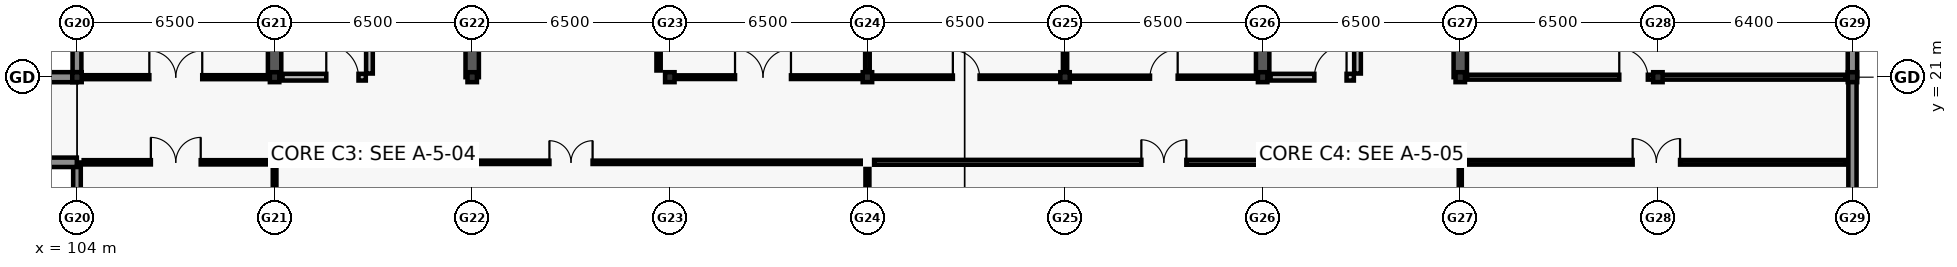
"""IFC4 building model, lengths in metres.
Left out: names, types, materials, properties, quantities, classifications, styles, units other than length and angle.
Written with IfcOpenShell. Run it as: python <this file> out.ifc"""

import sys

from ifc_helpers import new_model, si_unit, direction, frame, frame_2d, origin, origin_2d, place, context, subcontext, project, spatial, rectangle, i_section, extrude, element, fill, save


model = new_model("IFC4")
c1 = context("Model", 3, precision=1e-05, world=origin(), true_north=direction((0.0, 1.0)))
c2 = subcontext(c1, "Body", "Model", "MODEL_VIEW")
j1 = project(units=[si_unit("LENGTHUNIT", "METRE"), si_unit("PLANEANGLEUNIT", "RADIAN")], contexts=[c1])
p1 = place(None, origin())
s1 = spatial("IfcSite", under=j1, at=p1, CompositionType="ELEMENT")
p2 = place(p1, origin())
s2 = spatial("IfcBuilding", under=s1, at=p2, CompositionType="ELEMENT")
p3 = place(p2, frame((0.0, 0.0, 5.4)))
s3 = spatial("IfcBuildingStorey", under=s2, at=p3, CompositionType="ELEMENT", Elevation=5.4)
for number, where, z_axis, x_axis in (
    (1, (104.0, 21.0, 0.0), (0.0, 0.0, 1.0), (1.0, 0.0, 0.0)),
    (2, (110.5, 21.0, 0.0), (0.0, 0.0, 1.0), (1.0, 0.0, 0.0)),
    (3, (117.0, 21.0, 0.0), (0.0, 0.0, 1.0), (1.0, 0.0, 0.0)),
    (4, (123.5, 21.0, 0.0), (0.0, 0.0, 1.0), (1.0, 0.0, 0.0)),
    (5, (130.0, 21.0, 0.0), (0.0, 0.0, 1.0), (1.0, 0.0, 0.0)),
    (6, (136.5, 21.0, 0.0), (0.0, 0.0, 1.0), (1.0, 0.0, 0.0)),
    (7, (143.0, 21.0, 0.0), (0.0, 0.0, 1.0), (1.0, 0.0, 0.0)),
    (8, (149.5, 21.0, 0.0), (0.0, 0.0, 1.0), (1.0, 0.0, 0.0)),
    (9, (156.0, 21.0, 0.0), (0.0, 0.0, 1.0), (1.0, 0.0, 0.0)),
    (10, (162.4, 21.0, 0.0), (0.0, 0.0, 1.0), (1.0, 0.0, 0.0)),
):
    element("IfcColumn", number, at=place(p3, frame(where, z_axis=z_axis, x_axis=x_axis)), inside=s3, PredefinedType="COLUMN", context=c2, shape_type="SweptSolid", body=[
        extrude(i_section(OverallWidth=0.311, OverallDepth=0.327, WebThickness=0.016, FlangeThickness=0.025, FilletRadius=0.017, at=origin_2d()), origin(), (0.0, 0.0, 1.0), 4.2),
    ])
for number, where, z_axis, x_axis in (
    (11, (110.5, 21.0, 0.0), (0.0, 0.0, 1.0), (0.0, 1.0, 0.0)),
    (12, (117.0, 21.0, 0.0), (0.0, 0.0, 1.0), (0.0, 1.0, 0.0)),
    (13, (143.0, 21.0, 0.0), (0.0, 0.0, 1.0), (0.0, 1.0, 0.0)),
    (14, (149.5, 21.0, 0.0), (0.0, 0.0, 1.0), (0.0, 1.0, 0.0)),
):
    element("IfcWall", number, at=place(p3, frame(where, z_axis=z_axis, x_axis=x_axis)), inside=s3, PredefinedType="SHEAR", context=c2, shape_type="SweptSolid", body=[
        extrude(rectangle(XDim=6.38, YDim=0.44, at=frame_2d((3.19, 0.0))), origin(), (0.0, 0.0, 1.0), 3.96),
    ])
p4 = place(p3, frame((104.0, 14.405, 0.0), z_axis=(0.0, 0.0, 1.0), x_axis=(0.0, 1.0, 0.0)))
e15 = element("IfcWall", 15, at=p4, inside=s3, PredefinedType="SOLIDWALL", context=c2, shape_type="SweptSolid", body=[
    extrude(rectangle(XDim=3.79, YDim=0.25, at=frame_2d((1.895, 0.0))), origin(), (0.0, 0.0, 1.0), 3.32),
])
p5 = place(p4, frame((1.295, 0.0, 0.8)))
e16 = element("IfcOpeningElement", 16, at=p5, cuts=e15, PredefinedType="OPENING", context=c2, shape_type="SweptSolid", body=[
    extrude(rectangle(XDim=1.2, YDim=2.05, at=frame_2d((0.6, 1.025))), frame((0.0, 0.135, 0.0), z_axis=(0.0, -1.0, 0.0), x_axis=(1.0, 0.0, 0.0)), (0.0, 0.0, 1.0), 0.27),
])
p6 = place(p3, frame((162.4, 20.995, 0.0), z_axis=(0.0, 0.0, 1.0), x_axis=(0.0, -1.0, 0.0)))
e17 = element("IfcWall", 17, at=p6, inside=s3, PredefinedType="SOLIDWALL", context=c2, shape_type="SweptSolid", body=[
    extrude(rectangle(XDim=6.59, YDim=0.27, at=frame_2d((3.295, 0.0))), origin(), (0.0, 0.0, 1.0), 3.32),
])
p7 = place(p6, frame((4.002, 0.0, 0.8)))
e18 = element("IfcOpeningElement", 18, at=p7, cuts=e17, PredefinedType="OPENING", context=c2, shape_type="SweptSolid", body=[
    extrude(rectangle(XDim=1.35, YDim=2.05, at=frame_2d((0.675, 1.025))), frame((0.0, 0.145, 0.0), z_axis=(0.0, -1.0, 0.0), x_axis=(1.0, 0.0, 0.0)), (0.0, 0.0, 1.0), 0.29),
])
p8 = place(p3, frame((104.0, 21.005, 0.0), z_axis=(0.0, 0.0, 1.0), x_axis=(0.0, 1.0, 0.0)))
e19 = element("IfcWall", 19, at=p8, inside=s3, PredefinedType="SOLIDWALL", context=c2, shape_type="SweptSolid", body=[
    extrude(rectangle(XDim=6.59, YDim=0.29, at=frame_2d((3.295, 0.0))), origin(), (0.0, 0.0, 1.0), 3.32),
])
p9 = place(p8, frame((2.545, 0.0, 0.8)))
e20 = element("IfcOpeningElement", 20, at=p9, cuts=e19, PredefinedType="OPENING", context=c2, shape_type="SweptSolid", body=[
    extrude(rectangle(XDim=1.5, YDim=2.05, at=frame_2d((0.75, 1.025))), frame((0.0, 0.155, 0.0), z_axis=(0.0, -1.0, 0.0), x_axis=(1.0, 0.0, 0.0)), (0.0, 0.0, 1.0), 0.31),
])
p10 = place(p3, frame((162.4, 27.595, 0.0), z_axis=(0.0, 0.0, 1.0), x_axis=(0.0, -1.0, 0.0)))
e21 = element("IfcWall", 21, at=p10, inside=s3, PredefinedType="SOLIDWALL", context=c2, shape_type="SweptSolid", body=[
    extrude(rectangle(XDim=6.59, YDim=0.31, at=frame_2d((3.295, 0.0))), origin(), (0.0, 0.0, 1.0), 3.32),
])
p11 = place(p10, frame((2.47, 0.0, 0.8)))
e22 = element("IfcOpeningElement", 22, at=p11, cuts=e21, PredefinedType="OPENING", context=c2, shape_type="SweptSolid", body=[
    extrude(rectangle(XDim=1.65, YDim=2.05, at=frame_2d((0.825, 1.025))), frame((0.0, 0.165, 0.0), z_axis=(0.0, -1.0, 0.0), x_axis=(1.0, 0.0, 0.0)), (0.0, 0.0, 1.0), 0.33),
])
p12 = place(p3, frame((103.995, 18.2, 0.0), z_axis=(0.0, 0.0, 1.0), x_axis=(-1.0, 0.0, 0.0)))
e23 = element("IfcWall", 23, at=p12, inside=s3, PredefinedType="SOLIDWALL", context=c2, shape_type="SweptSolid", body=[
    extrude(rectangle(XDim=1.19, YDim=0.31, at=frame_2d((0.595, 0.0))), origin(), (0.0, 0.0, 1.0), 3.32),
])
p13 = place(p3, frame((102.805, 21.0, 0.0), z_axis=(0.0, 0.0, 1.0), x_axis=(1.0, 0.0, 0.0)))
e24 = element("IfcWall", 24, at=p13, inside=s3, PredefinedType="SOLIDWALL", context=c2, shape_type="SweptSolid", body=[
    extrude(rectangle(XDim=1.19, YDim=0.33, at=frame_2d((0.595, 0.0))), origin(), (0.0, 0.0, 1.0), 3.32),
])
p14 = place(p3, frame((113.62, 21.12, 0.0), z_axis=(0.0, 0.0, 1.0), x_axis=(0.0, 1.0, 0.0)))
e25 = element("IfcWall", 25, at=p14, inside=s3, PredefinedType="SOLIDWALL", context=c2, shape_type="SweptSolid", body=[
    extrude(rectangle(XDim=6.255, YDim=0.22, at=frame_2d((3.127, 0.0))), origin(), (0.0, 0.0, 1.0), 3.96),
])
p15 = place(p3, frame((110.76, 21.0, 0.0), z_axis=(0.0, 0.0, 1.0), x_axis=(1.0, 0.0, 0.0)))
e26 = element("IfcWall", 26, at=p15, inside=s3, PredefinedType="SOLIDWALL", context=c2, shape_type="SweptSolid", body=[
    extrude(rectangle(XDim=2.74, YDim=0.22, at=frame_2d((1.37, 0.0))), origin(), (0.0, 0.0, 1.0), 3.32),
])
p16 = place(p15, frame((1.44, 0.0, 0.0)))
e27 = element("IfcOpeningElement", 27, at=p16, cuts=e26, PredefinedType="OPENING", context=c2, shape_type="SweptSolid", body=[
    extrude(rectangle(XDim=1.06, YDim=2.1, at=frame_2d((0.53, 1.05))), frame((0.0, 0.12, 0.0), z_axis=(0.0, -1.0, 0.0), x_axis=(1.0, 0.0, 0.0)), (0.0, 0.0, 1.0), 0.24),
])
p17 = place(p3, frame((146.12, 21.12, 0.0), z_axis=(0.0, 0.0, 1.0), x_axis=(0.0, 1.0, 0.0)))
e28 = element("IfcWall", 28, at=p17, inside=s3, PredefinedType="SOLIDWALL", context=c2, shape_type="SweptSolid", body=[
    extrude(rectangle(XDim=6.255, YDim=0.22, at=frame_2d((3.127, 0.0))), origin(), (0.0, 0.0, 1.0), 3.96),
])
p18 = place(p3, frame((143.26, 21.0, 0.0), z_axis=(0.0, 0.0, 1.0), x_axis=(1.0, 0.0, 0.0)))
e29 = element("IfcWall", 29, at=p18, inside=s3, PredefinedType="SOLIDWALL", context=c2, shape_type="SweptSolid", body=[
    extrude(rectangle(XDim=2.74, YDim=0.22, at=frame_2d((1.37, 0.0))), origin(), (0.0, 0.0, 1.0), 3.32),
])
p19 = place(p18, frame((1.44, 0.0, 0.0)))
e30 = element("IfcOpeningElement", 30, at=p19, cuts=e29, PredefinedType="OPENING", context=c2, shape_type="SweptSolid", body=[
    extrude(rectangle(XDim=1.06, YDim=2.1, at=frame_2d((0.53, 1.05))), frame((0.0, 0.12, 0.0), z_axis=(0.0, -1.0, 0.0), x_axis=(1.0, 0.0, 0.0)), (0.0, 0.0, 1.0), 0.24),
])
p20 = place(p3, frame((123.13, 21.22, 0.0), z_axis=(0.0, 0.0, 1.0), x_axis=(0.0, 1.0, 0.0)))
e31 = element("IfcWall", 31, at=p20, inside=s3, PredefinedType="PARTITIONING", context=c2, shape_type="SweptSolid", body=[
    extrude(rectangle(XDim=2.76, YDim=0.14, at=frame_2d((1.38, 0.0))), origin(), (0.0, 0.0, 1.0), 3.3),
])
p21 = place(p20, frame((0.88, 0.0, 0.0)))
e32 = element("IfcOpeningElement", 32, at=p21, cuts=e31, PredefinedType="OPENING", context=c2, shape_type="SweptSolid", body=[
    extrude(rectangle(XDim=1.0, YDim=2.12, at=frame_2d((0.5, 1.06))), frame((0.0, 0.08, 0.0), z_axis=(0.0, -1.0, 0.0), x_axis=(1.0, 0.0, 0.0)), (0.0, 0.0, 1.0), 0.16),
])
p22 = place(p3, frame((130.0, 8.02, 0.0), z_axis=(0.0, 0.0, 1.0), x_axis=(0.0, 1.0, 0.0)))
e33 = element("IfcWall", 33, at=p22, inside=s3, PredefinedType="PARTITIONING", context=c2, shape_type="SweptSolid", body=[
    extrude(rectangle(XDim=9.96, YDim=0.13, at=frame_2d((4.98, 0.0))), origin(), (0.0, 0.0, 1.0), 3.3),
])
p23 = place(p3, frame((110.5, 14.62, 0.0), z_axis=(0.0, 0.0, 1.0), x_axis=(0.0, 1.0, 0.0)))
e34 = element("IfcWall", 34, at=p23, inside=s3, PredefinedType="PARTITIONING", context=c2, shape_type="SweptSolid", body=[
    extrude(rectangle(XDim=3.36, YDim=0.12, at=frame_2d((1.68, 0.0))), origin(), (0.0, 0.0, 1.0), 3.3),
])
p24 = place(p3, frame((110.72, 18.2, 0.0), z_axis=(0.0, 0.0, 1.0), x_axis=(1.0, 0.0, 0.0)))
e35 = element("IfcWall", 35, at=p24, inside=s3, PredefinedType="PARTITIONING", context=c2, shape_type="SweptSolid", body=[
    extrude(rectangle(XDim=19.06, YDim=0.11, at=frame_2d((9.53, 0.0))), origin(), (0.0, 0.0, 1.0), 3.3),
])
p25 = place(p24, frame((8.82, 0.0, 0.0)))
e36 = element("IfcOpeningElement", 36, at=p25, cuts=e35, PredefinedType="OPENING", context=c2, shape_type="SweptSolid", body=[
    extrude(rectangle(XDim=1.42, YDim=2.15, at=frame_2d((0.71, 1.075))), frame((0.0, 0.065, 0.0), z_axis=(0.0, -1.0, 0.0), x_axis=(1.0, 0.0, 0.0)), (0.0, 0.0, 1.0), 0.13),
])
p26 = place(p3, frame((149.5, 8.02, 0.0), z_axis=(0.0, 0.0, 1.0), x_axis=(0.0, 1.0, 0.0)))
e37 = element("IfcWall", 37, at=p26, inside=s3, PredefinedType="PARTITIONING", context=c2, shape_type="SweptSolid", body=[
    extrude(rectangle(XDim=9.96, YDim=0.1, at=frame_2d((4.98, 0.0))), origin(), (0.0, 0.0, 1.0), 3.3),
])
p27 = place(p3, frame((130.22, 18.2, 0.0), z_axis=(0.0, 0.0, 1.0), x_axis=(1.0, 0.0, 0.0)))
e38 = element("IfcWall", 38, at=p27, inside=s3, PredefinedType="PARTITIONING", context=c2, shape_type="SweptSolid", body=[
    extrude(rectangle(XDim=19.06, YDim=0.16, at=frame_2d((9.53, 0.0))), origin(), (0.0, 0.0, 1.0), 3.3),
])
p28 = place(p27, frame((8.79, 0.0, 0.0)))
e39 = element("IfcOpeningElement", 39, at=p28, cuts=e38, PredefinedType="OPENING", context=c2, shape_type="SweptSolid", body=[
    extrude(rectangle(XDim=1.48, YDim=2.18, at=frame_2d((0.74, 1.09))), frame((0.0, 0.09, 0.0), z_axis=(0.0, -1.0, 0.0), x_axis=(1.0, 0.0, 0.0)), (0.0, 0.0, 1.0), 0.18),
])
p29 = place(p3, frame((149.72, 18.2, 0.0), z_axis=(0.0, 0.0, 1.0), x_axis=(1.0, 0.0, 0.0)))
e40 = element("IfcWall", 40, at=p29, inside=s3, PredefinedType="PARTITIONING", context=c2, shape_type="SweptSolid", body=[
    extrude(rectangle(XDim=12.46, YDim=0.15, at=frame_2d((6.23, 0.0))), origin(), (0.0, 0.0, 1.0), 3.3),
])
p30 = place(p29, frame((5.45, 0.0, 0.0)))
e41 = element("IfcOpeningElement", 41, at=p30, cuts=e40, PredefinedType="OPENING", context=c2, shape_type="SweptSolid", body=[
    extrude(rectangle(XDim=1.56, YDim=2.18, at=frame_2d((0.78, 1.09))), frame((0.0, 0.085, 0.0), z_axis=(0.0, -1.0, 0.0), x_axis=(1.0, 0.0, 0.0)), (0.0, 0.0, 1.0), 0.17),
])
p31 = place(p3, frame((104.22, 18.2, 0.0), z_axis=(0.0, 0.0, 1.0), x_axis=(1.0, 0.0, 0.0)))
e42 = element("IfcWall", 42, at=p31, inside=s3, PredefinedType="PARTITIONING", context=c2, shape_type="SweptSolid", body=[
    extrude(rectangle(XDim=6.06, YDim=0.14, at=frame_2d((3.03, 0.0))), origin(), (0.0, 0.0, 1.0), 3.3),
])
p32 = place(p31, frame((2.21, 0.0, 0.0)))
e43 = element("IfcOpeningElement", 43, at=p32, cuts=e42, PredefinedType="OPENING", context=c2, shape_type="SweptSolid", body=[
    extrude(rectangle(XDim=1.64, YDim=2.2, at=frame_2d((0.82, 1.1))), frame((0.0, 0.08, 0.0), z_axis=(0.0, -1.0, 0.0), x_axis=(1.0, 0.0, 0.0)), (0.0, 0.0, 1.0), 0.16),
])
p33 = place(p3, frame((104.22, 21.0, 0.0), z_axis=(0.0, 0.0, 1.0), x_axis=(1.0, 0.0, 0.0)))
e44 = element("IfcWall", 44, at=p33, inside=s3, PredefinedType="PARTITIONING", context=c2, shape_type="SweptSolid", body=[
    extrude(rectangle(XDim=6.06, YDim=0.13, at=frame_2d((3.03, 0.0))), origin(), (0.0, 0.0, 1.0), 3.3),
])
p34 = place(p33, frame((2.16, 0.0, 0.0)))
e45 = element("IfcOpeningElement", 45, at=p34, cuts=e44, PredefinedType="OPENING", context=c2, shape_type="SweptSolid", body=[
    extrude(rectangle(XDim=1.74, YDim=2.2, at=frame_2d((0.87, 1.1))), frame((0.0, 0.075, 0.0), z_axis=(0.0, -1.0, 0.0), x_axis=(1.0, 0.0, 0.0)), (0.0, 0.0, 1.0), 0.15),
])
p35 = place(p3, frame((123.35, 21.0, 0.0), z_axis=(0.0, 0.0, 1.0), x_axis=(1.0, 0.0, 0.0)))
e46 = element("IfcWall", 46, at=p35, inside=s3, PredefinedType="PARTITIONING", context=c2, shape_type="SweptSolid", body=[
    extrude(rectangle(XDim=6.43, YDim=0.12, at=frame_2d((3.215, 0.0))), origin(), (0.0, 0.0, 1.0), 3.3),
])
p36 = place(p35, frame((2.295, 0.0, 0.0)))
e47 = element("IfcOpeningElement", 47, at=p36, cuts=e46, PredefinedType="OPENING", context=c2, shape_type="SweptSolid", body=[
    extrude(rectangle(XDim=1.84, YDim=2.22, at=frame_2d((0.92, 1.11))), frame((0.0, 0.07, 0.0), z_axis=(0.0, -1.0, 0.0), x_axis=(1.0, 0.0, 0.0)), (0.0, 0.0, 1.0), 0.14),
])
p37 = place(p3, frame((130.22, 21.0, 0.0), z_axis=(0.0, 0.0, 1.0), x_axis=(1.0, 0.0, 0.0)))
e48 = element("IfcWall", 48, at=p37, inside=s3, PredefinedType="PARTITIONING", context=c2, shape_type="SweptSolid", body=[
    extrude(rectangle(XDim=6.06, YDim=0.11, at=frame_2d((3.03, 0.0))), origin(), (0.0, 0.0, 1.0), 3.3),
])
p38 = place(p37, frame((2.59, 0.0, 0.0)))
e49 = element("IfcOpeningElement", 49, at=p38, cuts=e48, PredefinedType="OPENING", context=c2, shape_type="SweptSolid", body=[
    extrude(rectangle(XDim=0.88, YDim=2.04, at=frame_2d((0.44, 1.02))), frame((0.0, 0.065, 0.0), z_axis=(0.0, -1.0, 0.0), x_axis=(1.0, 0.0, 0.0)), (0.0, 0.0, 1.0), 0.13),
])
p39 = place(p3, frame((136.72, 21.0, 0.0), z_axis=(0.0, 0.0, 1.0), x_axis=(1.0, 0.0, 0.0)))
e50 = element("IfcWall", 50, at=p39, inside=s3, PredefinedType="PARTITIONING", context=c2, shape_type="SweptSolid", body=[
    extrude(rectangle(XDim=6.06, YDim=0.1, at=frame_2d((3.03, 0.0))), origin(), (0.0, 0.0, 1.0), 3.3),
])
p40 = place(p39, frame((2.575, 0.0, 0.0)))
e51 = element("IfcOpeningElement", 51, at=p40, cuts=e50, PredefinedType="OPENING", context=c2, shape_type="SweptSolid", body=[
    extrude(rectangle(XDim=0.91, YDim=2.06, at=frame_2d((0.455, 1.03))), frame((0.0, 0.06, 0.0), z_axis=(0.0, -1.0, 0.0), x_axis=(1.0, 0.0, 0.0)), (0.0, 0.0, 1.0), 0.12),
])
p41 = place(p3, frame((149.72, 21.0, 0.0), z_axis=(0.0, 0.0, 1.0), x_axis=(1.0, 0.0, 0.0)))
e52 = element("IfcWall", 52, at=p41, inside=s3, PredefinedType="PARTITIONING", context=c2, shape_type="SweptSolid", body=[
    extrude(rectangle(XDim=12.46, YDim=0.16, at=frame_2d((6.23, 0.0))), origin(), (0.0, 0.0, 1.0), 3.3),
])
p42 = place(p41, frame((5.01, 0.0, 0.0)))
e53 = element("IfcOpeningElement", 53, at=p42, cuts=e52, PredefinedType="OPENING", context=c2, shape_type="SweptSolid", body=[
    extrude(rectangle(XDim=0.94, YDim=2.08, at=frame_2d((0.47, 1.04))), frame((0.0, 0.09, 0.0), z_axis=(0.0, -1.0, 0.0), x_axis=(1.0, 0.0, 0.0)), (0.0, 0.0, 1.0), 0.18),
])
p43 = place(p3, frame((130.0, 21.22, 0.0), z_axis=(0.0, 0.0, 1.0), x_axis=(0.0, 1.0, 0.0)))
e54 = element("IfcWall", 54, at=p43, inside=s3, PredefinedType="PARTITIONING", context=c2, shape_type="SweptSolid", body=[
    extrude(rectangle(XDim=6.16, YDim=0.15, at=frame_2d((3.08, 0.0))), origin(), (0.0, 0.0, 1.0), 3.3),
])
p44 = place(p3, frame((136.5, 21.22, 0.0), z_axis=(0.0, 0.0, 1.0), x_axis=(0.0, 1.0, 0.0)))
e55 = element("IfcWall", 55, at=p44, inside=s3, PredefinedType="PARTITIONING", context=c2, shape_type="SweptSolid", body=[
    extrude(rectangle(XDim=6.16, YDim=0.14, at=frame_2d((3.08, 0.0))), origin(), (0.0, 0.0, 1.0), 3.3),
])
p45 = place(p16, origin())
e56 = element("IfcDoor", 56, at=p45, inside=s3, OperationType="SINGLE_SWING_LEFT", PredefinedType="DOOR", context=c2, shape_type="SweptSolid", body=[
    extrude(rectangle(XDim=1.06, YDim=2.1, at=frame_2d((0.53, 1.05))), frame((0.0, 0.025, 0.0), z_axis=(0.0, -1.0, 0.0), x_axis=(1.0, 0.0, 0.0)), (0.0, 0.0, 1.0), 0.05),
])
fill(e27, e56)
p46 = place(p19, origin())
e57 = element("IfcDoor", 57, at=p46, inside=s3, OperationType="SINGLE_SWING_RIGHT", PredefinedType="DOOR", context=c2, shape_type="SweptSolid", body=[
    extrude(rectangle(XDim=1.06, YDim=2.1, at=frame_2d((0.53, 1.05))), frame((0.0, 0.025, 0.0), z_axis=(0.0, -1.0, 0.0), x_axis=(1.0, 0.0, 0.0)), (0.0, 0.0, 1.0), 0.05),
])
fill(e30, e57)
p47 = place(p25, origin())
e58 = element("IfcDoor", 58, at=p47, inside=s3, OperationType="DOUBLE_DOOR_SINGLE_SWING", PredefinedType="DOOR", context=c2, shape_type="SweptSolid", body=[
    extrude(rectangle(XDim=1.42, YDim=2.15, at=frame_2d((0.71, 1.075))), frame((0.0, 0.025, 0.0), z_axis=(0.0, -1.0, 0.0), x_axis=(1.0, 0.0, 0.0)), (0.0, 0.0, 1.0), 0.05),
])
fill(e36, e58)
p48 = place(p28, origin())
e59 = element("IfcDoor", 59, at=p48, inside=s3, OperationType="DOUBLE_DOOR_SINGLE_SWING", PredefinedType="DOOR", context=c2, shape_type="SweptSolid", body=[
    extrude(rectangle(XDim=1.48, YDim=2.18, at=frame_2d((0.74, 1.09))), frame((0.0, 0.025, 0.0), z_axis=(0.0, -1.0, 0.0), x_axis=(1.0, 0.0, 0.0)), (0.0, 0.0, 1.0), 0.05),
])
fill(e39, e59)
p49 = place(p30, origin())
e60 = element("IfcDoor", 60, at=p49, inside=s3, OperationType="DOUBLE_DOOR_SINGLE_SWING", PredefinedType="DOOR", context=c2, shape_type="SweptSolid", body=[
    extrude(rectangle(XDim=1.56, YDim=2.18, at=frame_2d((0.78, 1.09))), frame((0.0, 0.025, 0.0), z_axis=(0.0, -1.0, 0.0), x_axis=(1.0, 0.0, 0.0)), (0.0, 0.0, 1.0), 0.05),
])
fill(e41, e60)
p50 = place(p32, origin())
e61 = element("IfcDoor", 61, at=p50, inside=s3, OperationType="DOUBLE_DOOR_SINGLE_SWING", PredefinedType="DOOR", context=c2, shape_type="SweptSolid", body=[
    extrude(rectangle(XDim=1.64, YDim=2.2, at=frame_2d((0.82, 1.1))), frame((0.0, 0.025, 0.0), z_axis=(0.0, -1.0, 0.0), x_axis=(1.0, 0.0, 0.0)), (0.0, 0.0, 1.0), 0.05),
])
fill(e43, e61)
p51 = place(p34, origin())
e62 = element("IfcDoor", 62, at=p51, inside=s3, OperationType="DOUBLE_DOOR_SINGLE_SWING", PredefinedType="DOOR", context=c2, shape_type="SweptSolid", body=[
    extrude(rectangle(XDim=1.74, YDim=2.2, at=frame_2d((0.87, 1.1))), frame((0.0, 0.025, 0.0), z_axis=(0.0, -1.0, 0.0), x_axis=(1.0, 0.0, 0.0)), (0.0, 0.0, 1.0), 0.05),
])
fill(e45, e62)
p52 = place(p36, origin())
e63 = element("IfcDoor", 63, at=p52, inside=s3, OperationType="DOUBLE_DOOR_SINGLE_SWING", PredefinedType="DOOR", context=c2, shape_type="SweptSolid", body=[
    extrude(rectangle(XDim=1.84, YDim=2.22, at=frame_2d((0.92, 1.11))), frame((0.0, 0.025, 0.0), z_axis=(0.0, -1.0, 0.0), x_axis=(1.0, 0.0, 0.0)), (0.0, 0.0, 1.0), 0.05),
])
fill(e47, e63)
p53 = place(p38, origin())
e64 = element("IfcDoor", 64, at=p53, inside=s3, OperationType="SINGLE_SWING_LEFT", PredefinedType="DOOR", context=c2, shape_type="SweptSolid", body=[
    extrude(rectangle(XDim=0.88, YDim=2.04, at=frame_2d((0.44, 1.02))), frame((0.0, 0.025, 0.0), z_axis=(0.0, -1.0, 0.0), x_axis=(1.0, 0.0, 0.0)), (0.0, 0.0, 1.0), 0.05),
])
fill(e49, e64)
p54 = place(p40, origin())
e65 = element("IfcDoor", 65, at=p54, inside=s3, OperationType="SINGLE_SWING_RIGHT", PredefinedType="DOOR", context=c2, shape_type="SweptSolid", body=[
    extrude(rectangle(XDim=0.91, YDim=2.06, at=frame_2d((0.455, 1.03))), frame((0.0, 0.025, 0.0), z_axis=(0.0, -1.0, 0.0), x_axis=(1.0, 0.0, 0.0)), (0.0, 0.0, 1.0), 0.05),
])
fill(e51, e65)
p55 = place(p42, origin())
e66 = element("IfcDoor", 66, at=p55, inside=s3, OperationType="SINGLE_SWING_LEFT", PredefinedType="DOOR", context=c2, shape_type="SweptSolid", body=[
    extrude(rectangle(XDim=0.94, YDim=2.08, at=frame_2d((0.47, 1.04))), frame((0.0, 0.025, 0.0), z_axis=(0.0, -1.0, 0.0), x_axis=(1.0, 0.0, 0.0)), (0.0, 0.0, 1.0), 0.05),
])
fill(e53, e66)
save(model, sys.argv[1])
